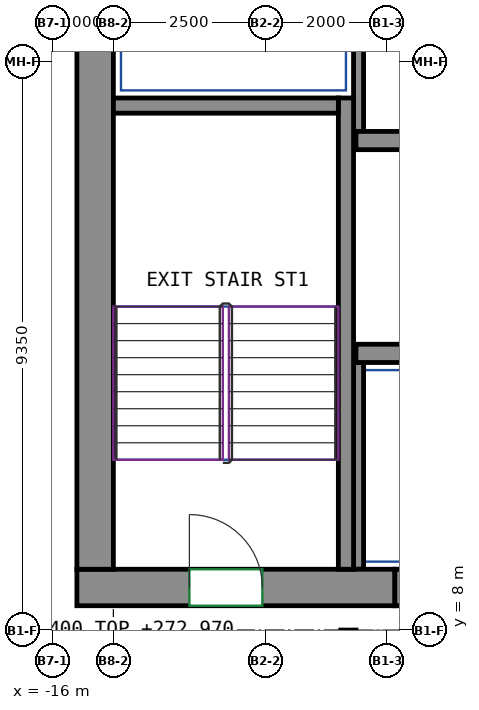
"""IFC4 building model, lengths in metres.
Left out: names, types, materials, properties, quantities, classifications, styles, units other than length and angle.
Written with IfcOpenShell. Run it as: python <this file> out.ifc"""

import sys

from ifc_helpers import new_model, si_unit, direction, frame, frame_2d, origin, place, context, subcontext, project, spatial, rectangle, extrude, source, transform, mapped, element, fill, save


model = new_model("IFC4")
c1 = context("Model", 3, precision=1e-05, world=origin(), true_north=direction((0.0, 1.0)))
c2 = subcontext(c1, "Body", "Model", "MODEL_VIEW")
j1 = project(units=[si_unit("LENGTHUNIT", "METRE"), si_unit("PLANEANGLEUNIT", "RADIAN")], contexts=[c1])
p1 = place(None, origin())
s1 = spatial("IfcSite", under=j1, at=p1, CompositionType="ELEMENT")
p2 = place(p1, origin())
s2 = spatial("IfcBuilding", under=s1, at=p2, CompositionType="ELEMENT")
p3 = place(p2, frame((0.0, 0.0, 270.4)))
s3 = spatial("IfcBuildingStorey", under=s2, at=p3, CompositionType="ELEMENT", Elevation=270.4)
m1 = source(origin(), c2, "Body", "SweptSolid", [
    extrude(rectangle(XDim=5.23, YDim=0.6, at=frame_2d((2.615, 0.0))), origin(), (0.0, 0.0, 1.0), 3.12),
])
p4 = place(p3, frame((-15.6, 8.7, 0.0), z_axis=(0.0, 0.0, 1.0), x_axis=(1.0, 0.0, 0.0)))
e1 = element("IfcWall", 1, at=p4, inside=s3, PredefinedType="SHEAR", context=c2, shape_type="MappedRepresentation", body=[
    mapped(m1, transform((0.0, 0.0, 0.0))),
])
p5 = place(p4, frame((1.85, 0.0, 0.0)))
e2 = element("IfcOpeningElement", 2, at=p5, cuts=e1, PredefinedType="OPENING", context=c2, shape_type="SweptSolid", body=[
    extrude(rectangle(XDim=1.2, YDim=2.1, at=frame_2d((0.6, 1.05))), frame((0.0, 0.31, 0.0), z_axis=(0.0, -1.0, 0.0), x_axis=(1.0, 0.0, 0.0)), (0.0, 0.0, 1.0), 0.62),
])
m2 = source(origin(), c2, "Body", "SweptSolid", [
    extrude(rectangle(XDim=12.0, YDim=0.6, at=frame_2d((6.0, 0.0))), origin(), (0.0, 0.0, 1.0), 3.12),
])
p6 = place(p3, frame((-15.3, 9.0, 0.0), z_axis=(0.0, 0.0, 1.0), x_axis=(0.0, 1.0, 0.0)))
e3 = element("IfcWall", 3, at=p6, inside=s3, PredefinedType="SHEAR", context=c2, shape_type="MappedRepresentation", body=[
    mapped(m2, transform((0.0, 0.0, 0.0))),
])
m3 = source(origin(), c2, "Body", "SweptSolid", [
    extrude(rectangle(XDim=7.75, YDim=0.25, at=frame_2d((3.875, 0.0))), origin(), (0.0, 0.0, 1.0), 3.12),
])
p7 = place(p3, frame((-11.175, 9.0, 0.0), z_axis=(0.0, 0.0, 1.0), x_axis=(0.0, 1.0, 0.0)))
e4 = element("IfcWall", 4, at=p7, inside=s3, PredefinedType="SHEAR", context=c2, shape_type="MappedRepresentation", body=[
    mapped(m3, transform((0.0, 0.0, 0.0))),
])
m4 = source(origin(), c2, "Body", "SweptSolid", [
    extrude(rectangle(XDim=3.7, YDim=0.25, at=frame_2d((1.85, 0.0))), origin(), (0.0, 0.0, 1.0), 3.12),
])
p8 = place(p3, frame((-15.0, 16.625, 0.0), z_axis=(0.0, 0.0, 1.0), x_axis=(1.0, 0.0, 0.0)))
e5 = element("IfcWall", 5, at=p8, inside=s3, PredefinedType="SHEAR", context=c2, shape_type="MappedRepresentation", body=[
    mapped(m4, transform((0.0, 0.0, 0.0))),
])
m5 = source(origin(), c2, "Body", "SweptSolid", [
    extrude(rectangle(XDim=6.0, YDim=0.3, at=frame_2d((3.0, 0.0))), origin(), (0.0, 0.0, 1.0), 3.12),
])
p9 = place(p3, frame((-11.01, 12.55, 0.0), z_axis=(0.0, 0.0, 1.0), x_axis=(1.0, 0.0, 0.0)))
e6 = element("IfcWall", 6, at=p9, inside=s3, PredefinedType="SHEAR", context=c2, shape_type="MappedRepresentation", body=[
    mapped(m5, transform((0.0, 0.0, 0.0))),
])
m6 = source(origin(), c2, "Body", "SweptSolid", [
    extrude(rectangle(XDim=22.08, YDim=0.3, at=frame_2d((11.04, 0.0))), origin(), (0.0, 0.0, 1.0), 3.12),
])
p10 = place(p3, frame((-11.01, 16.05, 0.0), z_axis=(0.0, 0.0, 1.0), x_axis=(1.0, 0.0, 0.0)))
e7 = element("IfcWall", 7, at=p10, inside=s3, PredefinedType="SHEAR", context=c2, shape_type="MappedRepresentation", body=[
    mapped(m6, transform((0.0, 0.0, 0.0))),
])
m7 = source(origin(), c2, "Body", "SweptSolid", [
    extrude(rectangle(XDim=4.8, YDim=0.165, at=frame_2d((2.4, 0.0))), origin(), (0.0, 0.0, 1.0), 3.12),
])
p11 = place(p3, frame((-10.968, 16.2, 0.0), z_axis=(0.0, 0.0, 1.0), x_axis=(0.0, 1.0, 0.0)))
e8 = element("IfcWall", 8, at=p11, inside=s3, PredefinedType="PARTITIONING", context=c2, shape_type="MappedRepresentation", body=[
    mapped(m7, transform((0.0, 0.0, 0.0))),
])
m8 = source(origin(), c2, "Body", "SweptSolid", [
    extrude(rectangle(XDim=3.4, YDim=0.165, at=frame_2d((1.7, 0.0))), origin(), (0.0, 0.0, 1.0), 3.12),
])
p12 = place(p3, frame((-10.968, 9.0, 0.0), z_axis=(0.0, 0.0, 1.0), x_axis=(0.0, 1.0, 0.0)))
e9 = element("IfcWall", 9, at=p12, inside=s3, PredefinedType="PARTITIONING", context=c2, shape_type="MappedRepresentation", body=[
    mapped(m8, transform((0.0, 0.0, 0.0))),
])
m9 = source(origin(), c2, "Body", "SweptSolid", [
    extrude(rectangle(XDim=1.4, YDim=0.6, at=frame_2d((0.7, 0.0))), origin(), (0.0, 0.0, 1.0), 2.7),
])
p13 = place(p3, frame((-10.37, 8.7, 0.0), z_axis=(0.0, 0.0, 1.0), x_axis=(1.0, 0.0, 0.0)))
e10 = element("IfcWall", 10, at=p13, inside=s3, PredefinedType="PARTITIONING", context=c2, shape_type="MappedRepresentation", body=[
    mapped(m9, transform((0.0, 0.0, 0.0))),
])
p14 = place(p13, frame((0.25, 0.0, 0.0)))
e11 = element("IfcOpeningElement", 11, at=p14, cuts=e10, PredefinedType="OPENING", context=c2, shape_type="SweptSolid", body=[
    extrude(rectangle(XDim=0.9, YDim=2.1, at=frame_2d((0.45, 1.05))), frame((0.0, 0.31, 0.0), z_axis=(0.0, -1.0, 0.0), x_axis=(1.0, 0.0, 0.0)), (0.0, 0.0, 1.0), 0.62),
])
p15 = place(p5, origin())
e12 = element("IfcDoor", 12, at=p15, inside=s3, OperationType="DOUBLE_DOOR_SINGLE_SWING", PredefinedType="DOOR", context=c2, shape_type="SweptSolid", body=[
    extrude(rectangle(XDim=1.2, YDim=2.1, at=frame_2d((0.6, 1.05))), frame((0.0, 0.205, 0.0), z_axis=(0.0, -1.0, 0.0), x_axis=(1.0, 0.0, 0.0)), (0.0, 0.0, 1.0), 0.05),
])
fill(e2, e12)
save(model, sys.argv[1])
